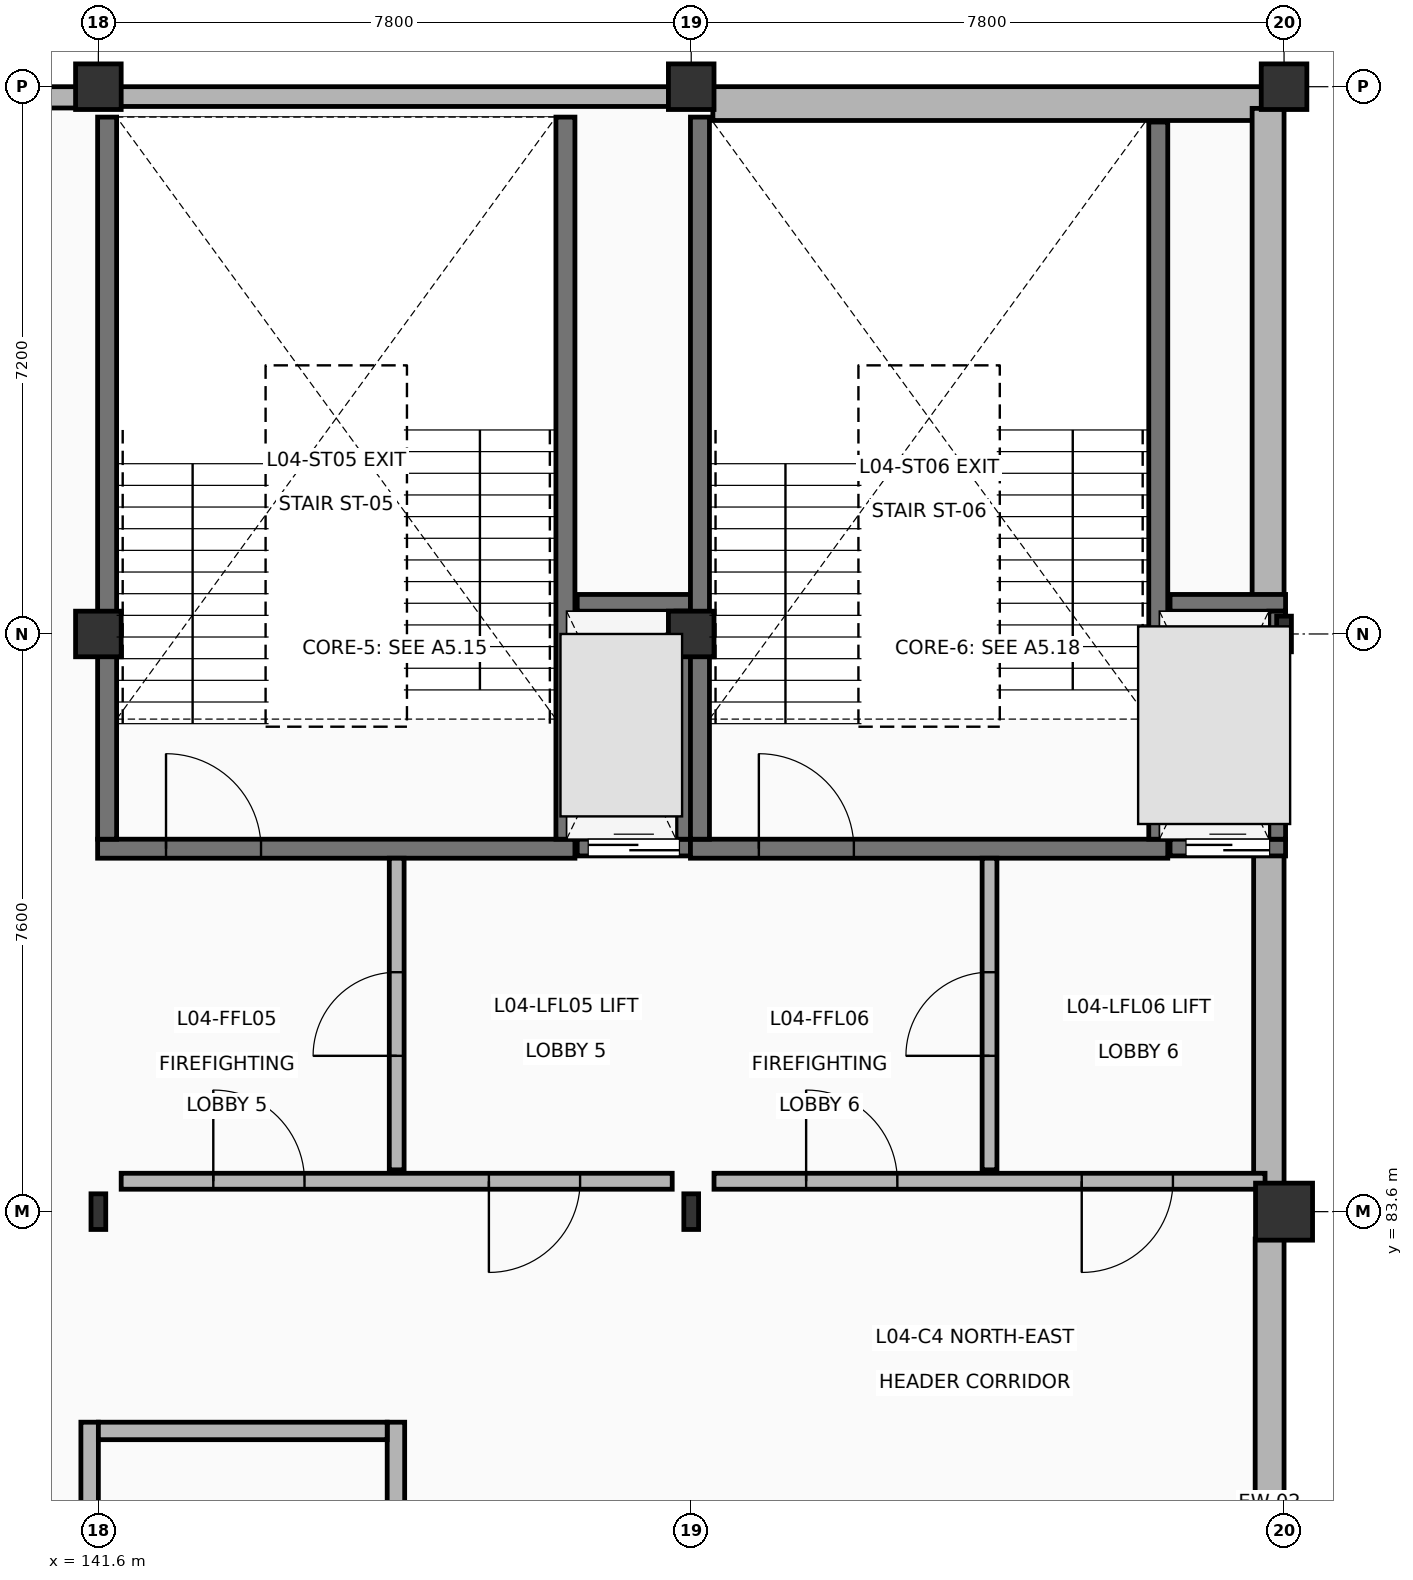
"""IFC4 building model, lengths in metres.
Left out: names, types, materials, properties, quantities, classifications, styles, units other than length and angle.
Written with IfcOpenShell. Run it as: python <this file> out.ifc"""

import sys

from ifc_helpers import new_model, si_unit, direction, frame, frame_2d, origin, origin_2d, place, context, subcontext, project, spatial, rectangle, circle, i_section, extrude, element, fill, save


model = new_model("IFC4")
c1 = context("Model", 3, precision=1e-05, world=origin(), true_north=direction((0.0, 1.0)))
c2 = subcontext(c1, "Body", "Model", "MODEL_VIEW")
j1 = project(units=[si_unit("LENGTHUNIT", "METRE"), si_unit("PLANEANGLEUNIT", "RADIAN")], contexts=[c1])
p1 = place(None, origin())
s1 = spatial("IfcSite", under=j1, at=p1, CompositionType="ELEMENT")
p2 = place(p1, origin())
s2 = spatial("IfcBuilding", under=s1, at=p2, CompositionType="ELEMENT")
p3 = place(p2, frame((0.0, 0.0, 15.3)))
s3 = spatial("IfcBuildingStorey", under=s2, at=p3, CompositionType="ELEMENT", Elevation=15.3)
p4 = place(p3, frame((141.6, 83.6, 0.0), z_axis=(0.0, 0.0, 1.0), x_axis=(1.0, 0.0, 0.0)))
e1 = element("IfcColumn", 1, at=p4, inside=s3, PredefinedType="COLUMN", context=c2, shape_type="SweptSolid", body=[
    extrude(i_section(OverallWidth=0.194, OverallDepth=0.469, WebThickness=0.013, FlangeThickness=0.021, at=origin_2d()), origin(), (0.0, 0.0, 1.0), 4.5),
])
for number, where, z_axis, x_axis in (
    (2, (141.6, 91.2, 0.0), (0.0, 0.0, 1.0), (1.0, 0.0, 0.0)),
    (3, (141.6, 98.4, 0.0), (0.0, 0.0, 1.0), (1.0, 0.0, 0.0)),
):
    element("IfcColumn", number, at=place(p3, frame(where, z_axis=z_axis, x_axis=x_axis)), inside=s3, PredefinedType="COLUMN", context=c2, shape_type="SweptSolid", body=[
        extrude(rectangle(XDim=0.6, YDim=0.6, at=origin_2d()), origin(), (0.0, 0.0, 1.0), 4.5),
    ])
p5 = place(p3, frame((149.4, 83.6, 0.0), z_axis=(0.0, 0.0, 1.0), x_axis=(1.0, 0.0, 0.0)))
e4 = element("IfcColumn", 4, at=p5, inside=s3, PredefinedType="COLUMN", context=c2, shape_type="SweptSolid", body=[
    extrude(i_section(OverallWidth=0.194, OverallDepth=0.469, WebThickness=0.013, FlangeThickness=0.021, at=origin_2d()), origin(), (0.0, 0.0, 1.0), 4.5),
])
for number, where, z_axis, x_axis in (
    (5, (149.4, 91.2, 0.0), (0.0, 0.0, 1.0), (1.0, 0.0, 0.0)),
    (6, (149.4, 98.4, 0.0), (0.0, 0.0, 1.0), (1.0, 0.0, 0.0)),
):
    element("IfcColumn", number, at=place(p3, frame(where, z_axis=z_axis, x_axis=x_axis)), inside=s3, PredefinedType="COLUMN", context=c2, shape_type="SweptSolid", body=[
        extrude(rectangle(XDim=0.6, YDim=0.6, at=origin_2d()), origin(), (0.0, 0.0, 1.0), 4.5),
    ])
p6 = place(p3, frame((157.2, 83.6, 0.0), z_axis=(0.0, 0.0, 1.0), x_axis=(1.0, 0.0, 0.0)))
e7 = element("IfcColumn", 7, at=p6, inside=s3, PredefinedType="COLUMN", context=c2, shape_type="SweptSolid", body=[
    extrude(circle(Radius=0.375, at=origin_2d()), origin(), (0.0, 0.0, 1.0), 4.5),
])
p7 = place(p3, frame((157.2, 91.2, 0.0), z_axis=(0.0, 0.0, 1.0), x_axis=(1.0, 0.0, 0.0)))
e8 = element("IfcColumn", 8, at=p7, inside=s3, PredefinedType="COLUMN", context=c2, shape_type="SweptSolid", body=[
    extrude(i_section(OverallWidth=0.194, OverallDepth=0.469, WebThickness=0.013, FlangeThickness=0.021, at=origin_2d()), origin(), (0.0, 0.0, 1.0), 4.5),
])
p8 = place(p3, frame((157.2, 98.4, 0.0), z_axis=(0.0, 0.0, 1.0), x_axis=(1.0, 0.0, 0.0)))
e9 = element("IfcColumn", 9, at=p8, inside=s3, PredefinedType="COLUMN", context=c2, shape_type="SweptSolid", body=[
    extrude(rectangle(XDim=0.6, YDim=0.6, at=origin_2d()), origin(), (0.0, 0.0, 1.0), 4.5),
])
p9 = place(p3, frame((134.095, 98.26, 0.0), z_axis=(0.0, 0.0, 1.0), x_axis=(1.0, 0.0, 0.0)))
e10 = element("IfcWall", 10, at=p9, inside=s3, PredefinedType="SOLIDWALL", context=c2, shape_type="SweptSolid", body=[
    extrude(rectangle(XDim=7.22, YDim=0.28, at=frame_2d((3.61, 0.0))), origin(), (0.0, 0.0, 1.0), 4.26),
])
p10 = place(p3, frame((141.885, 98.27, 0.0), z_axis=(0.0, 0.0, 1.0), x_axis=(1.0, 0.0, 0.0)))
e11 = element("IfcWall", 11, at=p10, inside=s3, PredefinedType="SOLIDWALL", context=c2, shape_type="SweptSolid", body=[
    extrude(rectangle(XDim=7.23, YDim=0.26, at=frame_2d((3.615, 0.0))), origin(), (0.0, 0.0, 1.0), 3.955),
])
p11 = place(p3, frame((149.685, 98.178, 0.0), z_axis=(0.0, 0.0, 1.0), x_axis=(1.0, 0.0, 0.0)))
e12 = element("IfcWall", 12, at=p11, inside=s3, PredefinedType="SOLIDWALL", context=c2, shape_type="SweptSolid", body=[
    extrude(rectangle(XDim=7.23, YDim=0.445, at=frame_2d((3.615, 0.0))), origin(), (0.0, 0.0, 1.0), 4.005),
])
p12 = place(p3, frame((156.99, 98.115, 0.0), z_axis=(0.0, 0.0, 1.0), x_axis=(0.0, -1.0, 0.0)))
e13 = element("IfcWall", 13, at=p12, inside=s3, PredefinedType="SOLIDWALL", context=c2, shape_type="SweptSolid", body=[
    extrude(rectangle(XDim=6.435, YDim=0.42, at=frame_2d((3.218, 0.0))), origin(), (0.0, 0.0, 1.0), 3.786),
])
p13 = place(p3, frame((157.0, 88.32, 0.0), z_axis=(0.0, 0.0, 1.0), x_axis=(0.0, -1.0, 0.0)))
e14 = element("IfcWall", 14, at=p13, inside=s3, PredefinedType="SOLIDWALL", context=c2, shape_type="SweptSolid", body=[
    extrude(rectangle(XDim=4.36, YDim=0.4, at=frame_2d((2.18, 0.0))), origin(), (0.0, 0.0, 1.0), 3.786),
])
p14 = place(p3, frame((157.01, 83.24, 0.0), z_axis=(0.0, 0.0, 1.0), x_axis=(0.0, -1.0, 0.0)))
e15 = element("IfcWall", 15, at=p14, inside=s3, PredefinedType="SOLIDWALL", context=c2, shape_type="SweptSolid", body=[
    extrude(rectangle(XDim=6.955, YDim=0.38, at=frame_2d((3.478, 0.0))), origin(), (0.0, 0.0, 1.0), 3.786),
])
p15 = place(p3, frame((141.59, 88.375, 0.0), z_axis=(0.0, 0.0, 1.0), x_axis=(1.0, 0.0, 0.0)))
e16 = element("IfcWall", 16, at=p15, inside=s3, PredefinedType="SHEAR", context=c2, shape_type="SweptSolid", body=[
    extrude(rectangle(XDim=6.28, YDim=0.25, at=frame_2d((3.14, 0.0))), origin(), (0.0, 0.0, 1.0), 4.26),
])
p16 = place(p15, frame((0.9, 0.0, 0.0)))
e17 = element("IfcOpeningElement", 17, at=p16, cuts=e16, PredefinedType="OPENING", context=c2, shape_type="SweptSolid", body=[
    extrude(rectangle(XDim=1.25, YDim=2.2, at=frame_2d((0.625, 1.1))), frame((0.0, 0.135, 0.0), z_axis=(0.0, -1.0, 0.0), x_axis=(1.0, 0.0, 0.0)), (0.0, 0.0, 1.0), 0.27),
])
for number, where, z_axis, x_axis in (
    (18, (141.715, 88.5, 0.0), (0.0, 0.0, 1.0), (0.0, 1.0, 0.0)),
    (19, (147.745, 88.5, 0.0), (0.0, 0.0, 1.0), (0.0, 1.0, 0.0)),
):
    element("IfcWall", number, at=place(p3, frame(where, z_axis=z_axis, x_axis=x_axis)), inside=s3, PredefinedType="SHEAR", context=c2, shape_type="SweptSolid", body=[
        extrude(rectangle(XDim=9.5, YDim=0.25, at=frame_2d((4.75, 0.0))), origin(), (0.0, 0.0, 1.0), 4.26),
    ])
p17 = place(p3, frame((147.9, 88.39, 0.0), z_axis=(0.0, 0.0, 1.0), x_axis=(1.0, 0.0, 0.0)))
e20 = element("IfcWall", 20, at=p17, inside=s3, PredefinedType="SHEAR", context=c2, shape_type="SweptSolid", body=[
    extrude(rectangle(XDim=1.49, YDim=0.22, at=frame_2d((0.745, 0.0))), origin(), (0.0, 0.0, 1.0), 4.26),
])
p18 = place(p17, frame((0.145, 0.0, 0.0)))
e21 = element("IfcOpeningElement", 21, at=p18, cuts=e20, PredefinedType="OPENING", context=c2, shape_type="SweptSolid", body=[
    extrude(rectangle(XDim=1.2, YDim=2.2, at=frame_2d((0.6, 1.1))), frame((0.0, 0.12, 0.0), z_axis=(0.0, -1.0, 0.0), x_axis=(1.0, 0.0, 0.0)), (0.0, 0.0, 1.0), 0.24),
])
p19 = place(p3, frame((147.9, 91.61, 0.0), z_axis=(0.0, 0.0, 1.0), x_axis=(1.0, 0.0, 0.0)))
e22 = element("IfcWall", 22, at=p19, inside=s3, PredefinedType="SHEAR", context=c2, shape_type="SweptSolid", body=[
    extrude(rectangle(XDim=1.49, YDim=0.22, at=frame_2d((0.745, 0.0))), origin(), (0.0, 0.0, 1.0), 4.26),
])
p20 = place(p3, frame((149.31, 88.5, 0.0), z_axis=(0.0, 0.0, 1.0), x_axis=(0.0, 1.0, 0.0)))
e23 = element("IfcWall", 23, at=p20, inside=s3, PredefinedType="SHEAR", context=c2, shape_type="SweptSolid", body=[
    extrude(rectangle(XDim=3.0, YDim=0.22, at=frame_2d((1.5, 0.0))), origin(), (0.0, 0.0, 1.0), 4.26),
])
p21 = place(p3, frame((141.9, 84.0, 0.0), z_axis=(0.0, 0.0, 1.0), x_axis=(1.0, 0.0, 0.0)))
e24 = element("IfcWall", 24, at=p21, inside=s3, PredefinedType="PARTITIONING", context=c2, shape_type="SweptSolid", body=[
    extrude(rectangle(XDim=7.25, YDim=0.21, at=frame_2d((3.625, 0.0))), origin(), (0.0, 0.0, 1.0), 4.26),
])
p22 = place(p21, frame((1.212, 0.0, 0.0)))
e25 = element("IfcOpeningElement", 25, at=p22, cuts=e24, PredefinedType="OPENING", context=c2, shape_type="SweptSolid", body=[
    extrude(rectangle(XDim=1.2, YDim=2.2, at=frame_2d((0.6, 1.1))), frame((0.0, 0.115, 0.0), z_axis=(0.0, -1.0, 0.0), x_axis=(1.0, 0.0, 0.0)), (0.0, 0.0, 1.0), 0.23),
])
p23 = place(p21, frame((4.838, 0.0, 0.0)))
e26 = element("IfcOpeningElement", 26, at=p23, cuts=e24, PredefinedType="OPENING", context=c2, shape_type="SweptSolid", body=[
    extrude(rectangle(XDim=1.2, YDim=2.2, at=frame_2d((0.6, 1.1))), frame((0.0, 0.115, 0.0), z_axis=(0.0, -1.0, 0.0), x_axis=(1.0, 0.0, 0.0)), (0.0, 0.0, 1.0), 0.23),
])
p24 = place(p3, frame((145.525, 84.15, 0.0), z_axis=(0.0, 0.0, 1.0), x_axis=(0.0, 1.0, 0.0)))
e27 = element("IfcWall", 27, at=p24, inside=s3, PredefinedType="PARTITIONING", context=c2, shape_type="SweptSolid", body=[
    extrude(rectangle(XDim=4.1, YDim=0.195, at=frame_2d((2.05, 0.0))), origin(), (0.0, 0.0, 1.0), 4.26),
])
p25 = place(p24, frame((1.5, 0.0, 0.0)))
e28 = element("IfcOpeningElement", 28, at=p25, cuts=e27, PredefinedType="OPENING", context=c2, shape_type="SweptSolid", body=[
    extrude(rectangle(XDim=1.1, YDim=2.15, at=frame_2d((0.55, 1.075))), frame((0.0, 0.107, 0.0), z_axis=(0.0, -1.0, 0.0), x_axis=(1.0, 0.0, 0.0)), (0.0, 0.0, 1.0), 0.215),
])
p26 = place(p3, frame((149.39, 88.375, 0.0), z_axis=(0.0, 0.0, 1.0), x_axis=(1.0, 0.0, 0.0)))
e29 = element("IfcWall", 29, at=p26, inside=s3, PredefinedType="SHEAR", context=c2, shape_type="SweptSolid", body=[
    extrude(rectangle(XDim=6.28, YDim=0.25, at=frame_2d((3.14, 0.0))), origin(), (0.0, 0.0, 1.0), 4.26),
])
p27 = place(p26, frame((0.9, 0.0, 0.0)))
e30 = element("IfcOpeningElement", 30, at=p27, cuts=e29, PredefinedType="OPENING", context=c2, shape_type="SweptSolid", body=[
    extrude(rectangle(XDim=1.25, YDim=2.2, at=frame_2d((0.625, 1.1))), frame((0.0, 0.135, 0.0), z_axis=(0.0, -1.0, 0.0), x_axis=(1.0, 0.0, 0.0)), (0.0, 0.0, 1.0), 0.27),
])
p28 = place(p3, frame((149.515, 88.5, 0.0), z_axis=(0.0, 0.0, 1.0), x_axis=(0.0, 1.0, 0.0)))
e31 = element("IfcWall", 31, at=p28, inside=s3, PredefinedType="SHEAR", context=c2, shape_type="SweptSolid", body=[
    extrude(rectangle(XDim=9.5, YDim=0.25, at=frame_2d((4.75, 0.0))), origin(), (0.0, 0.0, 1.0), 4.26),
])
p29 = place(p3, frame((155.545, 88.5, 0.0), z_axis=(0.0, 0.0, 1.0), x_axis=(0.0, 1.0, 0.0)))
e32 = element("IfcWall", 32, at=p29, inside=s3, PredefinedType="SHEAR", context=c2, shape_type="SweptSolid", body=[
    extrude(rectangle(XDim=9.435, YDim=0.25, at=frame_2d((4.718, 0.0))), origin(), (0.0, 0.0, 1.0), 4.26),
])
p30 = place(p3, frame((155.7, 88.39, 0.0), z_axis=(0.0, 0.0, 1.0), x_axis=(1.0, 0.0, 0.0)))
e33 = element("IfcWall", 33, at=p30, inside=s3, PredefinedType="SHEAR", context=c2, shape_type="SweptSolid", body=[
    extrude(rectangle(XDim=1.52, YDim=0.22, at=frame_2d((0.76, 0.0))), origin(), (0.0, 0.0, 1.0), 4.26),
])
p31 = place(p30, frame((0.21, 0.0, 0.0)))
e34 = element("IfcOpeningElement", 34, at=p31, cuts=e33, PredefinedType="OPENING", context=c2, shape_type="SweptSolid", body=[
    extrude(rectangle(XDim=1.1, YDim=2.15, at=frame_2d((0.55, 1.075))), frame((0.0, 0.12, 0.0), z_axis=(0.0, -1.0, 0.0), x_axis=(1.0, 0.0, 0.0)), (0.0, 0.0, 1.0), 0.24),
])
p32 = place(p3, frame((155.7, 91.61, 0.0), z_axis=(0.0, 0.0, 1.0), x_axis=(1.0, 0.0, 0.0)))
e35 = element("IfcWall", 35, at=p32, inside=s3, PredefinedType="SHEAR", context=c2, shape_type="SweptSolid", body=[
    extrude(rectangle(XDim=1.52, YDim=0.22, at=frame_2d((0.76, 0.0))), origin(), (0.0, 0.0, 1.0), 4.26),
])
p33 = place(p3, frame((157.11, 88.5, 0.0), z_axis=(0.0, 0.0, 1.0), x_axis=(0.0, 1.0, 0.0)))
e36 = element("IfcWall", 36, at=p33, inside=s3, PredefinedType="SHEAR", context=c2, shape_type="SweptSolid", body=[
    extrude(rectangle(XDim=3.0, YDim=0.22, at=frame_2d((1.5, 0.0))), origin(), (0.0, 0.0, 1.0), 4.26),
])
p34 = place(p3, frame((149.7, 84.0, 0.0), z_axis=(0.0, 0.0, 1.0), x_axis=(1.0, 0.0, 0.0)))
e37 = element("IfcWall", 37, at=p34, inside=s3, PredefinedType="PARTITIONING", context=c2, shape_type="SweptSolid", body=[
    extrude(rectangle(XDim=7.25, YDim=0.21, at=frame_2d((3.625, 0.0))), origin(), (0.0, 0.0, 1.0), 4.26),
])
p35 = place(p34, frame((1.212, 0.0, 0.0)))
e38 = element("IfcOpeningElement", 38, at=p35, cuts=e37, PredefinedType="OPENING", context=c2, shape_type="SweptSolid", body=[
    extrude(rectangle(XDim=1.2, YDim=2.2, at=frame_2d((0.6, 1.1))), frame((0.0, 0.115, 0.0), z_axis=(0.0, -1.0, 0.0), x_axis=(1.0, 0.0, 0.0)), (0.0, 0.0, 1.0), 0.23),
])
p36 = place(p34, frame((4.838, 0.0, 0.0)))
e39 = element("IfcOpeningElement", 39, at=p36, cuts=e37, PredefinedType="OPENING", context=c2, shape_type="SweptSolid", body=[
    extrude(rectangle(XDim=1.2, YDim=2.2, at=frame_2d((0.6, 1.1))), frame((0.0, 0.115, 0.0), z_axis=(0.0, -1.0, 0.0), x_axis=(1.0, 0.0, 0.0)), (0.0, 0.0, 1.0), 0.23),
])
p37 = place(p3, frame((153.325, 84.15, 0.0), z_axis=(0.0, 0.0, 1.0), x_axis=(0.0, 1.0, 0.0)))
e40 = element("IfcWall", 40, at=p37, inside=s3, PredefinedType="PARTITIONING", context=c2, shape_type="SweptSolid", body=[
    extrude(rectangle(XDim=4.1, YDim=0.195, at=frame_2d((2.05, 0.0))), origin(), (0.0, 0.0, 1.0), 4.26),
])
p38 = place(p37, frame((1.5, 0.0, 0.0)))
e41 = element("IfcOpeningElement", 41, at=p38, cuts=e40, PredefinedType="OPENING", context=c2, shape_type="SweptSolid", body=[
    extrude(rectangle(XDim=1.1, YDim=2.15, at=frame_2d((0.55, 1.075))), frame((0.0, 0.107, 0.0), z_axis=(0.0, -1.0, 0.0), x_axis=(1.0, 0.0, 0.0)), (0.0, 0.0, 1.0), 0.215),
])
p39 = place(p3, frame((141.485, 76.97, 0.0), z_axis=(0.0, 0.0, 1.0), x_axis=(0.0, 1.0, 0.0)))
e42 = element("IfcWall", 42, at=p39, inside=s3, PredefinedType="PLUMBINGWALL", context=c2, shape_type="SweptSolid", body=[
    extrude(rectangle(XDim=3.86, YDim=0.23, at=frame_2d((1.93, 0.0))), origin(), (0.0, 0.0, 1.0), 3.786),
])
p40 = place(p3, frame((145.515, 76.97, 0.0), z_axis=(0.0, 0.0, 1.0), x_axis=(0.0, 1.0, 0.0)))
e43 = element("IfcWall", 43, at=p40, inside=s3, PredefinedType="PLUMBINGWALL", context=c2, shape_type="SweptSolid", body=[
    extrude(rectangle(XDim=3.86, YDim=0.23, at=frame_2d((1.93, 0.0))), origin(), (0.0, 0.0, 1.0), 3.901),
])
p41 = place(p40, frame((1.405, 0.0, 0.0)))
e44 = element("IfcOpeningElement", 44, at=p41, cuts=e43, PredefinedType="OPENING", context=c2, shape_type="SweptSolid", body=[
    extrude(rectangle(XDim=1.05, YDim=2.1, at=frame_2d((0.525, 1.05))), frame((0.0, 0.125, 0.0), z_axis=(0.0, -1.0, 0.0), x_axis=(1.0, 0.0, 0.0)), (0.0, 0.0, 1.0), 0.25),
])
p42 = place(p3, frame((141.6, 80.715, 0.0), z_axis=(0.0, 0.0, 1.0), x_axis=(1.0, 0.0, 0.0)))
e45 = element("IfcWall", 45, at=p42, inside=s3, PredefinedType="PLUMBINGWALL", context=c2, shape_type="SweptSolid", body=[
    extrude(rectangle(XDim=3.8, YDim=0.23, at=frame_2d((1.9, 0.0))), origin(), (0.0, 0.0, 1.0), 3.786),
])
p43 = place(p16, origin())
e46 = element("IfcDoor", 46, at=p43, inside=s3, OperationType="SINGLE_SWING_LEFT", PredefinedType="DOOR", context=c2, shape_type="SweptSolid", body=[
    extrude(rectangle(XDim=1.25, YDim=2.2, at=frame_2d((0.625, 1.1))), frame((0.0, 0.025, 0.0), z_axis=(0.0, -1.0, 0.0), x_axis=(1.0, 0.0, 0.0)), (0.0, 0.0, 1.0), 0.05),
])
fill(e17, e46)
p44 = place(p18, origin())
e47 = element("IfcDoor", 47, at=p44, inside=s3, OperationType="DOUBLE_DOOR_SLIDING", PredefinedType="DOOR", context=c2, shape_type="SweptSolid", body=[
    extrude(rectangle(XDim=1.2, YDim=2.2, at=frame_2d((0.6, 1.1))), frame((0.0, 0.025, 0.0), z_axis=(0.0, -1.0, 0.0), x_axis=(1.0, 0.0, 0.0)), (0.0, 0.0, 1.0), 0.05),
])
fill(e21, e47)
p45 = place(p22, origin())
e48 = element("IfcDoor", 48, at=p45, inside=s3, OperationType="SINGLE_SWING_LEFT", PredefinedType="DOOR", context=c2, shape_type="SweptSolid", body=[
    extrude(rectangle(XDim=1.2, YDim=2.2, at=frame_2d((0.6, 1.1))), frame((0.0, 0.025, 0.0), z_axis=(0.0, -1.0, 0.0), x_axis=(1.0, 0.0, 0.0)), (0.0, 0.0, 1.0), 0.05),
])
fill(e25, e48)
p46 = place(p23, origin())
e49 = element("IfcDoor", 49, at=p46, inside=s3, OperationType="SINGLE_SWING_RIGHT", PredefinedType="DOOR", context=c2, shape_type="SweptSolid", body=[
    extrude(rectangle(XDim=1.2, YDim=2.2, at=frame_2d((0.6, 1.1))), frame((0.0, 0.025, 0.0), z_axis=(0.0, -1.0, 0.0), x_axis=(1.0, 0.0, 0.0)), (0.0, 0.0, 1.0), 0.05),
])
fill(e26, e49)
p47 = place(p25, origin())
e50 = element("IfcDoor", 50, at=p47, inside=s3, OperationType="SINGLE_SWING_LEFT", PredefinedType="DOOR", context=c2, shape_type="SweptSolid", body=[
    extrude(rectangle(XDim=1.1, YDim=2.15, at=frame_2d((0.55, 1.075))), frame((0.0, 0.025, 0.0), z_axis=(0.0, -1.0, 0.0), x_axis=(1.0, 0.0, 0.0)), (0.0, 0.0, 1.0), 0.05),
])
fill(e28, e50)
p48 = place(p27, origin())
e51 = element("IfcDoor", 51, at=p48, inside=s3, OperationType="SINGLE_SWING_LEFT", PredefinedType="DOOR", context=c2, shape_type="SweptSolid", body=[
    extrude(rectangle(XDim=1.25, YDim=2.2, at=frame_2d((0.625, 1.1))), frame((0.0, 0.025, 0.0), z_axis=(0.0, -1.0, 0.0), x_axis=(1.0, 0.0, 0.0)), (0.0, 0.0, 1.0), 0.05),
])
fill(e30, e51)
p49 = place(p31, origin())
e52 = element("IfcDoor", 52, at=p49, inside=s3, OperationType="DOUBLE_DOOR_SLIDING", PredefinedType="DOOR", context=c2, shape_type="SweptSolid", body=[
    extrude(rectangle(XDim=1.1, YDim=2.15, at=frame_2d((0.55, 1.075))), frame((0.0, 0.025, 0.0), z_axis=(0.0, -1.0, 0.0), x_axis=(1.0, 0.0, 0.0)), (0.0, 0.0, 1.0), 0.05),
])
fill(e34, e52)
p50 = place(p35, origin())
e53 = element("IfcDoor", 53, at=p50, inside=s3, OperationType="SINGLE_SWING_LEFT", PredefinedType="DOOR", context=c2, shape_type="SweptSolid", body=[
    extrude(rectangle(XDim=1.2, YDim=2.2, at=frame_2d((0.6, 1.1))), frame((0.0, 0.025, 0.0), z_axis=(0.0, -1.0, 0.0), x_axis=(1.0, 0.0, 0.0)), (0.0, 0.0, 1.0), 0.05),
])
fill(e38, e53)
p51 = place(p36, origin())
e54 = element("IfcDoor", 54, at=p51, inside=s3, OperationType="SINGLE_SWING_RIGHT", PredefinedType="DOOR", context=c2, shape_type="SweptSolid", body=[
    extrude(rectangle(XDim=1.2, YDim=2.2, at=frame_2d((0.6, 1.1))), frame((0.0, 0.025, 0.0), z_axis=(0.0, -1.0, 0.0), x_axis=(1.0, 0.0, 0.0)), (0.0, 0.0, 1.0), 0.05),
])
fill(e39, e54)
p52 = place(p38, origin())
e55 = element("IfcDoor", 55, at=p52, inside=s3, OperationType="SINGLE_SWING_LEFT", PredefinedType="DOOR", context=c2, shape_type="SweptSolid", body=[
    extrude(rectangle(XDim=1.1, YDim=2.15, at=frame_2d((0.55, 1.075))), frame((0.0, 0.025, 0.0), z_axis=(0.0, -1.0, 0.0), x_axis=(1.0, 0.0, 0.0)), (0.0, 0.0, 1.0), 0.05),
])
fill(e41, e55)
save(model, sys.argv[1])
